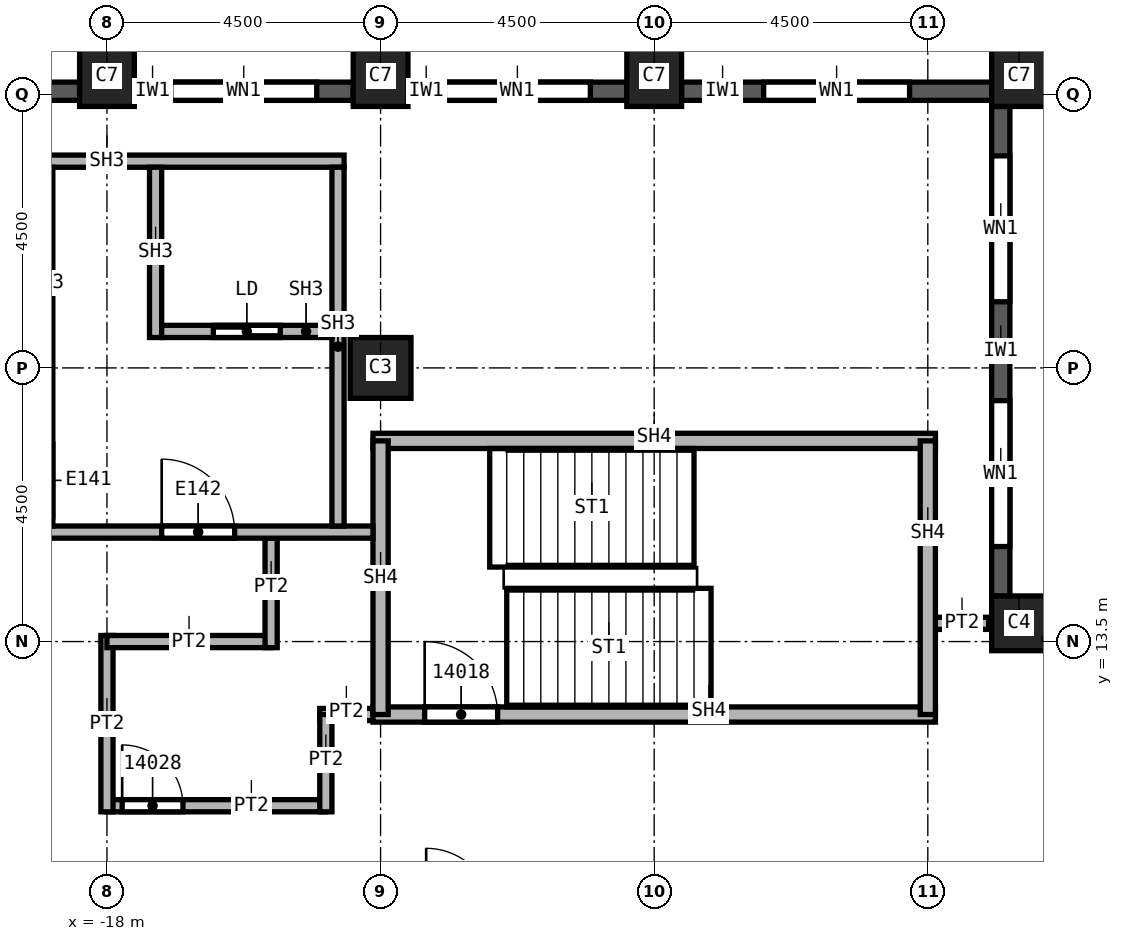
"""IFC4 building model, lengths in metres.
Left out: names, types, materials, properties, quantities, classifications, styles, units other than length and angle.
Written with IfcOpenShell. Run it as: python <this file> out.ifc"""

import sys

from ifc_helpers import new_model, si_unit, direction, frame, frame_2d, origin, origin_2d, place, context, subcontext, project, spatial, rectangle, extrude, element, fill, save


model = new_model("IFC4")
c1 = context("Model", 3, precision=1e-05, world=origin(), true_north=direction((0.0, 1.0)))
c2 = subcontext(c1, "Body", "Model", "MODEL_VIEW")
j1 = project(units=[si_unit("LENGTHUNIT", "METRE"), si_unit("PLANEANGLEUNIT", "RADIAN")], contexts=[c1])
p1 = place(None, origin())
s1 = spatial("IfcSite", under=j1, at=p1, CompositionType="ELEMENT")
p2 = place(p1, origin())
s2 = spatial("IfcBuilding", under=s1, at=p2, CompositionType="ELEMENT")
p3 = place(p2, frame((0.0, 0.0, 224.0)))
s3 = spatial("IfcBuildingStorey", under=s2, at=p3, CompositionType="ELEMENT", Elevation=224.0)
p4 = place(p3, frame((-13.5, 18.0, 0.0), z_axis=(0.0, 0.0, 1.0), x_axis=(1.0, 0.0, 0.0)))
e1 = element("IfcColumn", 1, at=p4, inside=s3, PredefinedType="COLUMN", context=c2, shape_type="SweptSolid", body=[
    extrude(rectangle(XDim=1.0, YDim=1.0, at=origin_2d()), origin(), (0.0, 0.0, 1.0), 3.72),
])
for number, where, z_axis, x_axis in (
    (2, (-3.0, 22.8, 0.0), (0.0, 0.0, 1.0), (1.0, 0.0, 0.0)),
    (3, (-9.0, 22.8, 0.0), (0.0, 0.0, 1.0), (1.0, 0.0, 0.0)),
    (4, (-13.5, 22.8, 0.0), (0.0, 0.0, 1.0), (1.0, 0.0, 0.0)),
    (5, (-18.0, 22.8, 0.0), (0.0, 0.0, 1.0), (1.0, 0.0, 0.0)),
):
    element("IfcColumn", number, at=place(p3, frame(where, z_axis=z_axis, x_axis=x_axis)), inside=s3, PredefinedType="COLUMN", context=c2, shape_type="SweptSolid", body=[
        extrude(rectangle(XDim=0.9, YDim=1.0, at=origin_2d()), origin(), (0.0, 0.0, 1.0), 3.72),
    ])
p5 = place(p3, frame((-3.0, 13.8, 0.0), z_axis=(0.0, 0.0, 1.0), x_axis=(1.0, 0.0, 0.0)))
e6 = element("IfcColumn", 6, at=p5, inside=s3, PredefinedType="COLUMN", context=c2, shape_type="SweptSolid", body=[
    extrude(rectangle(XDim=0.9, YDim=0.9, at=origin_2d()), origin(), (0.0, 0.0, 1.0), 3.72),
])
p6 = place(p3, frame((-3.3, 14.25, 0.0), z_axis=(0.0, 0.0, 1.0), x_axis=(0.0, 1.0, 0.0)))
e7 = element("IfcWall", 7, at=p6, inside=s3, PredefinedType="SOLIDWALL", context=c2, shape_type="SweptSolid", body=[
    extrude(rectangle(XDim=8.05, YDim=0.3, at=frame_2d((4.025, 0.0))), origin(), (0.0, 0.0, 1.0), 3.12),
])
p7 = place(p6, frame((0.812, 0.0, 0.8)))
e8 = element("IfcOpeningElement", 8, at=p7, cuts=e7, PredefinedType="OPENING", context=c2, shape_type="SweptSolid", body=[
    extrude(rectangle(XDim=2.4, YDim=1.95, at=frame_2d((1.2, 0.975))), frame((0.0, 0.15, 0.0), z_axis=(0.0, -1.0, 0.0), x_axis=(1.0, 0.0, 0.0)), (0.0, 0.0, 1.0), 0.3),
])
p8 = place(p6, frame((4.837, 0.0, 0.8)))
e9 = element("IfcOpeningElement", 9, at=p8, cuts=e7, PredefinedType="OPENING", context=c2, shape_type="SweptSolid", body=[
    extrude(rectangle(XDim=2.4, YDim=1.95, at=frame_2d((1.2, 0.975))), frame((0.0, 0.15, 0.0), z_axis=(0.0, -1.0, 0.0), x_axis=(1.0, 0.0, 0.0)), (0.0, 0.0, 1.0), 0.3),
])
p9 = place(p3, frame((-3.45, 22.55, 0.0), z_axis=(0.0, 0.0, 1.0), x_axis=(-1.0, 0.0, 0.0)))
e10 = element("IfcWall", 10, at=p9, inside=s3, PredefinedType="SOLIDWALL", context=c2, shape_type="SweptSolid", body=[
    extrude(rectangle(XDim=5.1, YDim=0.3, at=frame_2d((2.55, 0.0))), origin(), (0.0, 0.0, 1.0), 3.12),
])
p10 = place(p9, frame((1.35, 0.0, 0.8)))
e11 = element("IfcOpeningElement", 11, at=p10, cuts=e10, PredefinedType="OPENING", context=c2, shape_type="SweptSolid", body=[
    extrude(rectangle(XDim=2.4, YDim=1.95, at=frame_2d((1.2, 0.975))), frame((0.0, 0.15, 0.0), z_axis=(0.0, -1.0, 0.0), x_axis=(1.0, 0.0, 0.0)), (0.0, 0.0, 1.0), 0.3),
])
p11 = place(p3, frame((-9.45, 22.55, 0.0), z_axis=(0.0, 0.0, 1.0), x_axis=(-1.0, 0.0, 0.0)))
e12 = element("IfcWall", 12, at=p11, inside=s3, PredefinedType="SOLIDWALL", context=c2, shape_type="SweptSolid", body=[
    extrude(rectangle(XDim=3.6, YDim=0.3, at=frame_2d((1.8, 0.0))), origin(), (0.0, 0.0, 1.0), 3.12),
])
p12 = place(p11, frame((0.6, 0.0, 0.8)))
e13 = element("IfcOpeningElement", 13, at=p12, cuts=e12, PredefinedType="OPENING", context=c2, shape_type="SweptSolid", body=[
    extrude(rectangle(XDim=2.4, YDim=1.95, at=frame_2d((1.2, 0.975))), frame((0.0, 0.15, 0.0), z_axis=(0.0, -1.0, 0.0), x_axis=(1.0, 0.0, 0.0)), (0.0, 0.0, 1.0), 0.3),
])
p13 = place(p3, frame((-13.95, 22.55, 0.0), z_axis=(0.0, 0.0, 1.0), x_axis=(-1.0, 0.0, 0.0)))
e14 = element("IfcWall", 14, at=p13, inside=s3, PredefinedType="SOLIDWALL", context=c2, shape_type="SweptSolid", body=[
    extrude(rectangle(XDim=3.6, YDim=0.3, at=frame_2d((1.8, 0.0))), origin(), (0.0, 0.0, 1.0), 3.12),
])
p14 = place(p13, frame((0.6, 0.0, 0.8)))
e15 = element("IfcOpeningElement", 15, at=p14, cuts=e14, PredefinedType="OPENING", context=c2, shape_type="SweptSolid", body=[
    extrude(rectangle(XDim=2.4, YDim=1.95, at=frame_2d((1.2, 0.975))), frame((0.0, 0.15, 0.0), z_axis=(0.0, -1.0, 0.0), x_axis=(1.0, 0.0, 0.0)), (0.0, 0.0, 1.0), 0.3),
])
p15 = place(p3, frame((-18.45, 22.55, 0.0), z_axis=(0.0, 0.0, 1.0), x_axis=(-1.0, 0.0, 0.0)))
e16 = element("IfcWall", 16, at=p15, inside=s3, PredefinedType="SOLIDWALL", context=c2, shape_type="SweptSolid", body=[
    extrude(rectangle(XDim=3.6, YDim=0.3, at=frame_2d((1.8, 0.0))), origin(), (0.0, 0.0, 1.0), 3.12),
])
p16 = place(p15, frame((0.6, 0.0, 0.8)))
e17 = element("IfcOpeningElement", 17, at=p16, cuts=e16, PredefinedType="OPENING", context=c2, shape_type="SweptSolid", body=[
    extrude(rectangle(XDim=2.4, YDim=1.95, at=frame_2d((1.2, 0.975))), frame((0.0, 0.15, 0.0), z_axis=(0.0, -1.0, 0.0), x_axis=(1.0, 0.0, 0.0)), (0.0, 0.0, 1.0), 0.3),
])
p17 = place(p3, frame((-18.0, 10.8, 0.0), z_axis=(0.0, 0.0, 1.0), x_axis=(1.0, 0.0, 0.0)))
e18 = element("IfcWall", 18, at=p17, inside=s3, PredefinedType="PARTITIONING", context=c2, shape_type="SweptSolid", body=[
    extrude(rectangle(XDim=3.6, YDim=0.2, at=frame_2d((1.8, 0.0))), origin(), (0.0, 0.0, 1.0), 3.72),
])
p18 = place(p17, frame((0.25, 0.0, 0.0)))
e19 = element("IfcOpeningElement", 19, at=p18, cuts=e18, PredefinedType="OPENING", context=c2, shape_type="SweptSolid", body=[
    extrude(rectangle(XDim=1.0, YDim=2.1, at=frame_2d((0.5, 1.05))), frame((0.0, 0.1, 0.0), z_axis=(0.0, -1.0, 0.0), x_axis=(1.0, 0.0, 0.0)), (0.0, 0.0, 1.0), 0.2),
])
p19 = place(p3, frame((-18.0, 13.6, 0.0), z_axis=(0.0, 0.0, 1.0), x_axis=(0.0, -1.0, 0.0)))
e20 = element("IfcWall", 20, at=p19, inside=s3, PredefinedType="PARTITIONING", context=c2, shape_type="SweptSolid", body=[
    extrude(rectangle(XDim=2.9, YDim=0.2, at=frame_2d((1.45, 0.0))), origin(), (0.0, 0.0, 1.0), 3.72),
])
p20 = place(p3, frame((-15.3, 13.5, 0.0), z_axis=(0.0, 0.0, 1.0), x_axis=(-1.0, 0.0, 0.0)))
e21 = element("IfcWall", 21, at=p20, inside=s3, PredefinedType="PARTITIONING", context=c2, shape_type="SweptSolid", body=[
    extrude(rectangle(XDim=2.7, YDim=0.2, at=frame_2d((1.35, 0.0))), origin(), (0.0, 0.0, 1.0), 3.72),
])
p21 = place(p3, frame((-15.3, 15.2, 0.0), z_axis=(0.0, 0.0, 1.0), x_axis=(0.0, -1.0, 0.0)))
e22 = element("IfcWall", 22, at=p21, inside=s3, PredefinedType="PARTITIONING", context=c2, shape_type="SweptSolid", body=[
    extrude(rectangle(XDim=1.8, YDim=0.2, at=frame_2d((0.9, 0.0))), origin(), (0.0, 0.0, 1.0), 3.72),
])
p22 = place(p3, frame((-14.5, 12.3, 0.0), z_axis=(0.0, 0.0, 1.0), x_axis=(1.0, 0.0, 0.0)))
e23 = element("IfcWall", 23, at=p22, inside=s3, PredefinedType="PARTITIONING", context=c2, shape_type="SweptSolid", body=[
    extrude(rectangle(XDim=1.125, YDim=0.2, at=frame_2d((0.562, 0.0))), origin(), (0.0, 0.0, 1.0), 3.72),
])
p23 = place(p3, frame((-14.4, 10.7, 0.0), z_axis=(0.0, 0.0, 1.0), x_axis=(0.0, 1.0, 0.0)))
e24 = element("IfcWall", 24, at=p23, inside=s3, PredefinedType="PARTITIONING", context=c2, shape_type="SweptSolid", body=[
    extrude(rectangle(XDim=1.6, YDim=0.2, at=frame_2d((0.8, 0.0))), origin(), (0.0, 0.0, 1.0), 3.72),
])
p24 = place(p3, frame((-4.5, 13.8, 0.0), z_axis=(0.0, 0.0, 1.0), x_axis=(1.0, 0.0, 0.0)))
e25 = element("IfcWall", 25, at=p24, inside=s3, PredefinedType="PARTITIONING", context=c2, shape_type="SweptSolid", body=[
    extrude(rectangle(XDim=1.0, YDim=0.2, at=frame_2d((0.5, 0.0))), origin(), (0.0, 0.0, 1.0), 3.72),
])
p25 = place(p3, frame((-13.625, 12.3, 0.0), z_axis=(0.0, 0.0, 1.0), x_axis=(1.0, 0.0, 0.0)))
e26 = element("IfcWall", 26, at=p25, inside=s3, PredefinedType="SOLIDWALL", context=c2, shape_type="SweptSolid", body=[
    extrude(rectangle(XDim=9.25, YDim=0.25, at=frame_2d((4.625, 0.0))), origin(), (0.0, 0.0, 1.0), 3.72),
])
p26 = place(p25, frame((0.85, 0.0, 0.0)))
e27 = element("IfcOpeningElement", 27, at=p26, cuts=e26, PredefinedType="OPENING", context=c2, shape_type="SweptSolid", body=[
    extrude(rectangle(XDim=1.2, YDim=2.1, at=frame_2d((0.6, 1.05))), frame((0.0, 0.125, 0.0), z_axis=(0.0, -1.0, 0.0), x_axis=(1.0, 0.0, 0.0)), (0.0, 0.0, 1.0), 0.25),
])
p27 = place(p3, frame((-13.625, 16.8, 0.0), z_axis=(0.0, 0.0, 1.0), x_axis=(1.0, 0.0, 0.0)))
e28 = element("IfcWall", 28, at=p27, inside=s3, PredefinedType="SOLIDWALL", context=c2, shape_type="SweptSolid", body=[
    extrude(rectangle(XDim=9.25, YDim=0.25, at=frame_2d((4.625, 0.0))), origin(), (0.0, 0.0, 1.0), 3.72),
])
for number, where, z_axis, x_axis in (
    (29, (-13.5, 12.3, 0.0), (0.0, 0.0, 1.0), (0.0, 1.0, 0.0)),
    (30, (-4.5, 16.8, 0.0), (0.0, 0.0, 1.0), (0.0, -1.0, 0.0)),
):
    element("IfcWall", number, at=place(p3, frame(where, z_axis=z_axis, x_axis=x_axis)), inside=s3, PredefinedType="SOLIDWALL", context=c2, shape_type="SweptSolid", body=[
        extrude(rectangle(XDim=4.5, YDim=0.25, at=frame_2d((2.25, 0.0))), origin(), (0.0, 0.0, 1.0), 3.72),
    ])
p28 = place(p3, frame((-21.9, 15.3, 0.0), z_axis=(0.0, 0.0, 1.0), x_axis=(1.0, 0.0, 0.0)))
e31 = element("IfcWall", 31, at=p28, inside=s3, PredefinedType="SOLIDWALL", context=c2, shape_type="SweptSolid", body=[
    extrude(rectangle(XDim=8.275, YDim=0.2, at=frame_2d((4.137, 0.0))), origin(), (0.0, 0.0, 1.0), 3.72),
])
p29 = place(p28, frame((4.8, 0.0, 0.0)))
e32 = element("IfcOpeningElement", 32, at=p29, cuts=e31, PredefinedType="OPENING", context=c2, shape_type="SweptSolid", body=[
    extrude(rectangle(XDim=1.2, YDim=2.1, at=frame_2d((0.6, 1.05))), frame((0.0, 0.1, 0.0), z_axis=(0.0, -1.0, 0.0), x_axis=(1.0, 0.0, 0.0)), (0.0, 0.0, 1.0), 0.2),
])
p30 = place(p3, frame((-21.9, 21.4, 0.0), z_axis=(0.0, 0.0, 1.0), x_axis=(1.0, 0.0, 0.0)))
e33 = element("IfcWall", 33, at=p30, inside=s3, PredefinedType="SOLIDWALL", context=c2, shape_type="SweptSolid", body=[
    extrude(rectangle(XDim=7.8, YDim=0.2, at=frame_2d((3.9, 0.0))), origin(), (0.0, 0.0, 1.0), 3.72),
])
p31 = place(p3, frame((-14.2, 15.4, 0.0), z_axis=(0.0, 0.0, 1.0), x_axis=(0.0, 1.0, 0.0)))
e34 = element("IfcWall", 34, at=p31, inside=s3, PredefinedType="SOLIDWALL", context=c2, shape_type="SweptSolid", body=[
    extrude(rectangle(XDim=5.9, YDim=0.2, at=frame_2d((2.95, 0.0))), origin(), (0.0, 0.0, 1.0), 3.72),
])
p32 = place(p3, frame((-18.99, 15.4, 0.0), z_axis=(0.0, 0.0, 1.0), x_axis=(0.0, 1.0, 0.0)))
e35 = element("IfcWall", 35, at=p32, inside=s3, PredefinedType="SOLIDWALL", context=c2, shape_type="SweptSolid", body=[
    extrude(rectangle(XDim=5.9, YDim=0.2, at=frame_2d((2.95, 0.0))), origin(), (0.0, 0.0, 1.0), 3.72),
])
p33 = place(p32, frame((0.15, 0.0, 0.0)))
e36 = element("IfcOpeningElement", 36, at=p33, cuts=e35, PredefinedType="OPENING", context=c2, shape_type="SweptSolid", body=[
    extrude(rectangle(XDim=1.2, YDim=2.1, at=frame_2d((0.6, 1.05))), frame((0.0, 0.1, 0.0), z_axis=(0.0, -1.0, 0.0), x_axis=(1.0, 0.0, 0.0)), (0.0, 0.0, 1.0), 0.2),
])
p34 = place(p3, frame((-17.2, 18.5, 0.0), z_axis=(0.0, 0.0, 1.0), x_axis=(0.0, 1.0, 0.0)))
e37 = element("IfcWall", 37, at=p34, inside=s3, PredefinedType="SOLIDWALL", context=c2, shape_type="SweptSolid", body=[
    extrude(rectangle(XDim=2.8, YDim=0.2, at=frame_2d((1.4, 0.0))), origin(), (0.0, 0.0, 1.0), 3.72),
])
p35 = place(p3, frame((-17.1, 18.6, 0.0), z_axis=(0.0, 0.0, 1.0), x_axis=(1.0, 0.0, 0.0)))
e38 = element("IfcWall", 38, at=p35, inside=s3, PredefinedType="SOLIDWALL", context=c2, shape_type="SweptSolid", body=[
    extrude(rectangle(XDim=2.8, YDim=0.2, at=frame_2d((1.4, 0.0))), origin(), (0.0, 0.0, 1.0), 3.72),
])
p36 = place(p35, frame((0.85, 0.0, 0.0)))
e39 = element("IfcOpeningElement", 39, at=p36, cuts=e38, PredefinedType="OPENING", context=c2, shape_type="SweptSolid", body=[
    extrude(rectangle(XDim=1.1, YDim=2.1, at=frame_2d((0.55, 1.05))), frame((0.0, 0.1, 0.0), z_axis=(0.0, -1.0, 0.0), x_axis=(1.0, 0.0, 0.0)), (0.0, 0.0, 1.0), 0.2),
])
p37 = place(p7, origin())
e40 = element("IfcWindow", 40, at=p37, inside=s3, PartitioningType="SINGLE_PANEL", PredefinedType="WINDOW", context=c2, shape_type="SweptSolid", body=[
    extrude(rectangle(XDim=2.4, YDim=1.95, at=frame_2d((1.2, 0.975))), frame((0.0, 0.03, 0.0), z_axis=(0.0, -1.0, 0.0), x_axis=(1.0, 0.0, 0.0)), (0.0, 0.0, 1.0), 0.06),
])
fill(e8, e40)
p38 = place(p8, origin())
e41 = element("IfcWindow", 41, at=p38, inside=s3, PartitioningType="SINGLE_PANEL", PredefinedType="WINDOW", context=c2, shape_type="SweptSolid", body=[
    extrude(rectangle(XDim=2.4, YDim=1.95, at=frame_2d((1.2, 0.975))), frame((0.0, 0.03, 0.0), z_axis=(0.0, -1.0, 0.0), x_axis=(1.0, 0.0, 0.0)), (0.0, 0.0, 1.0), 0.06),
])
fill(e9, e41)
p39 = place(p10, origin())
e42 = element("IfcWindow", 42, at=p39, inside=s3, PartitioningType="SINGLE_PANEL", PredefinedType="WINDOW", context=c2, shape_type="SweptSolid", body=[
    extrude(rectangle(XDim=2.4, YDim=1.95, at=frame_2d((1.2, 0.975))), frame((0.0, 0.03, 0.0), z_axis=(0.0, -1.0, 0.0), x_axis=(1.0, 0.0, 0.0)), (0.0, 0.0, 1.0), 0.06),
])
fill(e11, e42)
p40 = place(p12, origin())
e43 = element("IfcWindow", 43, at=p40, inside=s3, PartitioningType="SINGLE_PANEL", PredefinedType="WINDOW", context=c2, shape_type="SweptSolid", body=[
    extrude(rectangle(XDim=2.4, YDim=1.95, at=frame_2d((1.2, 0.975))), frame((0.0, 0.03, 0.0), z_axis=(0.0, -1.0, 0.0), x_axis=(1.0, 0.0, 0.0)), (0.0, 0.0, 1.0), 0.06),
])
fill(e13, e43)
p41 = place(p14, origin())
e44 = element("IfcWindow", 44, at=p41, inside=s3, PartitioningType="SINGLE_PANEL", PredefinedType="WINDOW", context=c2, shape_type="SweptSolid", body=[
    extrude(rectangle(XDim=2.4, YDim=1.95, at=frame_2d((1.2, 0.975))), frame((0.0, 0.03, 0.0), z_axis=(0.0, -1.0, 0.0), x_axis=(1.0, 0.0, 0.0)), (0.0, 0.0, 1.0), 0.06),
])
fill(e15, e44)
p42 = place(p26, origin())
e45 = element("IfcDoor", 45, at=p42, inside=s3, OperationType="SINGLE_SWING_LEFT", PredefinedType="DOOR", context=c2, shape_type="SweptSolid", body=[
    extrude(rectangle(XDim=1.2, YDim=2.1, at=frame_2d((0.6, 1.05))), frame((0.0, 0.025, 0.0), z_axis=(0.0, -1.0, 0.0), x_axis=(1.0, 0.0, 0.0)), (0.0, 0.0, 1.0), 0.05),
])
fill(e27, e45)
p43 = place(p18, origin())
e46 = element("IfcDoor", 46, at=p43, inside=s3, OperationType="SINGLE_SWING_LEFT", PredefinedType="DOOR", context=c2, shape_type="SweptSolid", body=[
    extrude(rectangle(XDim=1.0, YDim=2.1, at=frame_2d((0.5, 1.05))), frame((0.0, 0.025, 0.0), z_axis=(0.0, -1.0, 0.0), x_axis=(1.0, 0.0, 0.0)), (0.0, 0.0, 1.0), 0.05),
])
fill(e19, e46)
p44 = place(p36, origin())
e47 = element("IfcDoor", 47, at=p44, inside=s3, OperationType="SLIDING_TO_LEFT", PredefinedType="DOOR", context=c2, shape_type="SweptSolid", body=[
    extrude(rectangle(XDim=1.1, YDim=2.1, at=frame_2d((0.55, 1.05))), frame((0.0, 0.025, 0.0), z_axis=(0.0, -1.0, 0.0), x_axis=(1.0, 0.0, 0.0)), (0.0, 0.0, 1.0), 0.05),
])
fill(e39, e47)
p45 = place(p29, origin())
e48 = element("IfcDoor", 48, at=p45, inside=s3, OperationType="SINGLE_SWING_RIGHT", PredefinedType="DOOR", context=c2, shape_type="SweptSolid", body=[
    extrude(rectangle(XDim=1.2, YDim=2.1, at=frame_2d((0.6, 1.05))), frame((0.0, 0.025, 0.0), z_axis=(0.0, -1.0, 0.0), x_axis=(1.0, 0.0, 0.0)), (0.0, 0.0, 1.0), 0.05),
])
fill(e32, e48)
save(model, sys.argv[1])
